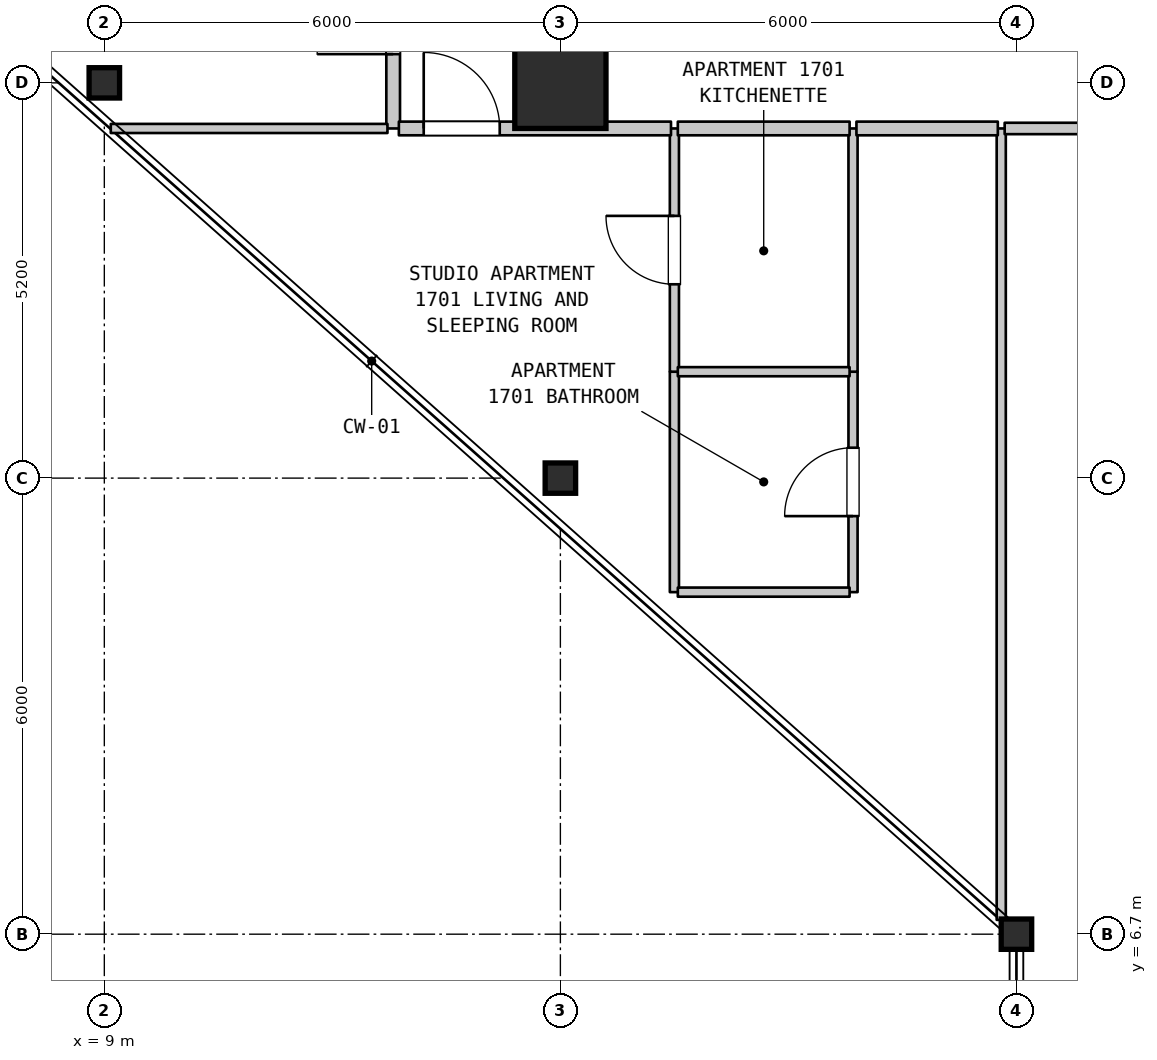
"""IFC4 building model, lengths in metres.
Left out: names, types, materials, properties, quantities, classifications, styles, units other than length and angle.
Written with IfcOpenShell. Run it as: python <this file> out.ifc"""

import sys

from ifc_helpers import new_model, si_unit, direction, frame, frame_2d, origin, origin_2d, place, context, subcontext, project, spatial, rectangle, i_section, extrude, element, fill, save


model = new_model("IFC4")
c1 = context("Model", 3, precision=1e-05, world=origin(), true_north=direction((0.0, 1.0)))
c2 = subcontext(c1, "Body", "Model", "MODEL_VIEW")
j1 = project(units=[si_unit("LENGTHUNIT", "METRE"), si_unit("PLANEANGLEUNIT", "RADIAN")], contexts=[c1])
p1 = place(None, origin())
s1 = spatial("IfcSite", under=j1, at=p1, CompositionType="ELEMENT")
p2 = place(p1, origin())
s2 = spatial("IfcBuilding", under=s1, at=p2, CompositionType="ELEMENT")
p3 = place(p2, frame((0.0, 0.0, 73.8)))
s3 = spatial("IfcBuildingStorey", under=s2, at=p3, CompositionType="ELEMENT", Elevation=73.8)
for number, where, z_axis, x_axis in (
    (1, (9.0, 17.9, 0.0), (0.0, 0.0, 1.0), (1.0, 0.0, 0.0)),
    (2, (15.0, 12.7, 0.0), (0.0, 0.0, 1.0), (1.0, 0.0, 0.0)),
):
    element("IfcColumn", number, at=place(p3, frame(where, z_axis=z_axis, x_axis=x_axis)), inside=s3, PredefinedType="COLUMN", context=c2, shape_type="SweptSolid", body=[
        extrude(i_section(OverallWidth=0.401, OverallDepth=0.399, WebThickness=0.025, FlangeThickness=0.04, FilletRadius=0.015, at=origin_2d()), origin(), (0.0, 0.0, 1.0), 3.7),
    ])
p4 = place(p3, frame((15.0, 17.9, 0.0), z_axis=(0.0, 0.0, 1.0), x_axis=(1.0, 0.0, 0.0)))
e3 = element("IfcColumn", 3, at=p4, inside=s3, PredefinedType="COLUMN", context=c2, shape_type="SweptSolid", body=[
    extrude(rectangle(XDim=1.2, YDim=1.2, at=origin_2d()), origin(), (0.0, 0.0, 1.0), 3.7),
])
p5 = place(p3, frame((21.0, 6.7, 0.0), z_axis=(0.0, 0.0, 1.0), x_axis=(1.0, 0.0, 0.0)))
e4 = element("IfcColumn", 4, at=p5, inside=s3, PredefinedType="COLUMN", context=c2, shape_type="SweptSolid", body=[
    extrude(i_section(OverallWidth=0.401, OverallDepth=0.399, WebThickness=0.025, FlangeThickness=0.04, FilletRadius=0.015, at=origin_2d()), origin(), (0.0, 0.0, 1.0), 3.7),
])
p6 = place(p3, frame((12.8, 17.3, 0.0), z_axis=(0.0, 0.0, 1.0), x_axis=(0.0, 1.0, 0.0)))
e5 = element("IfcWall", 5, at=p6, inside=s3, PredefinedType="STANDARD", context=c2, shape_type="SweptSolid", body=[
    extrude(rectangle(XDim=3.1, YDim=0.18, at=frame_2d((1.55, 0.0))), origin(), (0.0, 0.0, 1.0), 3.385),
])
p7 = place(p6, frame((0.978, 0.0, 0.0)))
e6 = element("IfcOpeningElement", 6, at=p7, cuts=e5, PredefinedType="OPENING", context=c2, shape_type="SweptSolid", body=[
    extrude(rectangle(XDim=1.0, YDim=2.15, at=frame_2d((0.5, 1.075))), frame((0.0, 0.1, 0.0), z_axis=(0.0, -1.0, 0.0), x_axis=(1.0, 0.0, 0.0)), (0.0, 0.0, 1.0), 0.2),
])
p8 = place(p3, frame((16.5, 11.2, 0.0), z_axis=(0.0, 0.0, 1.0), x_axis=(0.0, 1.0, 0.0)))
e7 = element("IfcWall", 7, at=p8, inside=s3, PredefinedType="PARTITIONING", context=c2, shape_type="SweptSolid", body=[
    extrude(rectangle(XDim=2.9, YDim=0.12, at=frame_2d((1.45, 0.0))), origin(), (0.0, 0.0, 1.0), 3.385),
])
p9 = place(p3, frame((16.5, 14.1, 0.0), z_axis=(0.0, 0.0, 1.0), x_axis=(0.0, 1.0, 0.0)))
e8 = element("IfcWall", 8, at=p9, inside=s3, PredefinedType="PARTITIONING", context=c2, shape_type="SweptSolid", body=[
    extrude(rectangle(XDim=3.2, YDim=0.12, at=frame_2d((1.6, 0.0))), origin(), (0.0, 0.0, 1.0), 3.385),
])
p10 = place(p9, frame((1.15, 0.0, 0.0)))
e9 = element("IfcOpeningElement", 9, at=p10, cuts=e8, PredefinedType="OPENING", context=c2, shape_type="SweptSolid", body=[
    extrude(rectangle(XDim=0.9, YDim=2.15, at=frame_2d((0.45, 1.075))), frame((0.0, 0.07, 0.0), z_axis=(0.0, -1.0, 0.0), x_axis=(1.0, 0.0, 0.0)), (0.0, 0.0, 1.0), 0.14),
])
p11 = place(p3, frame((18.85, 11.2, 0.0), z_axis=(0.0, 0.0, 1.0), x_axis=(0.0, 1.0, 0.0)))
e10 = element("IfcWall", 10, at=p11, inside=s3, PredefinedType="PARTITIONING", context=c2, shape_type="SweptSolid", body=[
    extrude(rectangle(XDim=2.9, YDim=0.12, at=frame_2d((1.45, 0.0))), origin(), (0.0, 0.0, 1.0), 3.385),
])
p12 = place(p11, frame((1.0, 0.0, 0.0)))
e11 = element("IfcOpeningElement", 11, at=p12, cuts=e10, PredefinedType="OPENING", context=c2, shape_type="SweptSolid", body=[
    extrude(rectangle(XDim=0.9, YDim=2.1, at=frame_2d((0.45, 1.05))), frame((0.0, 0.07, 0.0), z_axis=(0.0, -1.0, 0.0), x_axis=(1.0, 0.0, 0.0)), (0.0, 0.0, 1.0), 0.14),
])
p13 = place(p3, frame((18.85, 14.1, 0.0), z_axis=(0.0, 0.0, 1.0), x_axis=(0.0, 1.0, 0.0)))
e12 = element("IfcWall", 12, at=p13, inside=s3, PredefinedType="PARTITIONING", context=c2, shape_type="SweptSolid", body=[
    extrude(rectangle(XDim=3.2, YDim=0.12, at=frame_2d((1.6, 0.0))), origin(), (0.0, 0.0, 1.0), 3.385),
])
p14 = place(p3, frame((20.8, 6.888, 0.0), z_axis=(0.0, 0.0, 1.0), x_axis=(0.0, 1.0, 0.0)))
e13 = element("IfcWall", 13, at=p14, inside=s3, PredefinedType="PARTITIONING", context=c2, shape_type="SweptSolid", body=[
    extrude(rectangle(XDim=10.412, YDim=0.12, at=frame_2d((5.206, 0.0))), origin(), (0.0, 0.0, 1.0), 3.385),
])
for number, where, z_axis, x_axis in (
    (14, (16.545, 11.2, 0.0), (0.0, 0.0, 1.0), (1.0, 0.0, 0.0)),
    (15, (16.545, 14.1, 0.0), (0.0, 0.0, 1.0), (1.0, 0.0, 0.0)),
):
    element("IfcWall", number, at=place(p3, frame(where, z_axis=z_axis, x_axis=x_axis)), inside=s3, PredefinedType="PARTITIONING", context=c2, shape_type="SweptSolid", body=[
        extrude(rectangle(XDim=2.26, YDim=0.12, at=frame_2d((1.13, 0.0))), origin(), (0.0, 0.0, 1.0), 3.385),
    ])
p15 = place(p3, frame((9.085, 17.3, 0.0), z_axis=(0.0, 0.0, 1.0), x_axis=(1.0, 0.0, 0.0)))
e16 = element("IfcWall", 16, at=p15, inside=s3, PredefinedType="PARTITIONING", context=c2, shape_type="SweptSolid", body=[
    extrude(rectangle(XDim=3.64, YDim=0.12, at=frame_2d((1.82, 0.0))), origin(), (0.0, 0.0, 1.0), 3.385),
])
p16 = place(p3, frame((12.875, 17.3, 0.0), z_axis=(0.0, 0.0, 1.0), x_axis=(1.0, 0.0, 0.0)))
e17 = element("IfcWall", 17, at=p16, inside=s3, PredefinedType="STANDARD", context=c2, shape_type="SweptSolid", body=[
    extrude(rectangle(XDim=3.58, YDim=0.18, at=frame_2d((1.79, 0.0))), origin(), (0.0, 0.0, 1.0), 3.385),
])
p17 = place(p16, frame((0.327, 0.0, 0.0)))
e18 = element("IfcOpeningElement", 18, at=p17, cuts=e17, PredefinedType="OPENING", context=c2, shape_type="SweptSolid", body=[
    extrude(rectangle(XDim=1.0, YDim=2.15, at=frame_2d((0.5, 1.075))), frame((0.0, 0.1, 0.0), z_axis=(0.0, -1.0, 0.0), x_axis=(1.0, 0.0, 0.0)), (0.0, 0.0, 1.0), 0.2),
])
p18 = place(p3, frame((16.545, 17.3, 0.0), z_axis=(0.0, 0.0, 1.0), x_axis=(1.0, 0.0, 0.0)))
e19 = element("IfcWall", 19, at=p18, inside=s3, PredefinedType="STANDARD", context=c2, shape_type="SweptSolid", body=[
    extrude(rectangle(XDim=2.26, YDim=0.18, at=frame_2d((1.13, 0.0))), origin(), (0.0, 0.0, 1.0), 3.385),
])
p19 = place(p3, frame((18.895, 17.3, 0.0), z_axis=(0.0, 0.0, 1.0), x_axis=(1.0, 0.0, 0.0)))
e20 = element("IfcWall", 20, at=p19, inside=s3, PredefinedType="STANDARD", context=c2, shape_type="SweptSolid", body=[
    extrude(rectangle(XDim=1.86, YDim=0.18, at=frame_2d((0.93, 0.0))), origin(), (0.0, 0.0, 1.0), 3.385),
])
p20 = place(p3, frame((20.845, 17.3, 0.0), z_axis=(0.0, 0.0, 1.0), x_axis=(1.0, 0.0, 0.0)))
e21 = element("IfcWall", 21, at=p20, inside=s3, PredefinedType="STANDARD", context=c2, shape_type="SweptSolid", body=[
    extrude(rectangle(XDim=3.91, YDim=0.15, at=frame_2d((1.955, 0.0))), origin(), (0.0, 0.0, 1.0), 3.385),
])
p21 = place(p20, frame((1.455, 0.0, 0.0)))
e22 = element("IfcOpeningElement", 22, at=p21, cuts=e21, PredefinedType="OPENING", context=c2, shape_type="SweptSolid", body=[
    extrude(rectangle(XDim=1.0, YDim=2.15, at=frame_2d((0.5, 1.075))), frame((0.0, 0.085, 0.0), z_axis=(0.0, -1.0, 0.0), x_axis=(1.0, 0.0, 0.0)), (0.0, 0.0, 1.0), 0.17),
])
p22 = place(p7, origin())
e23 = element("IfcDoor", 23, at=p22, inside=s3, OperationType="SINGLE_SWING_LEFT", PredefinedType="DOOR", context=c2, shape_type="SweptSolid", body=[
    extrude(rectangle(XDim=1.0, YDim=2.15, at=frame_2d((0.5, 1.075))), frame((0.0, 0.025, 0.0), z_axis=(0.0, -1.0, 0.0), x_axis=(1.0, 0.0, 0.0)), (0.0, 0.0, 1.0), 0.05),
])
fill(e6, e23)
p23 = place(p10, origin())
e24 = element("IfcDoor", 24, at=p23, inside=s3, OperationType="SINGLE_SWING_RIGHT", PredefinedType="DOOR", context=c2, shape_type="SweptSolid", body=[
    extrude(rectangle(XDim=0.9, YDim=2.15, at=frame_2d((0.45, 1.075))), frame((0.0, 0.025, 0.0), z_axis=(0.0, -1.0, 0.0), x_axis=(1.0, 0.0, 0.0)), (0.0, 0.0, 1.0), 0.05),
])
fill(e9, e24)
p24 = place(p12, origin())
e25 = element("IfcDoor", 25, at=p24, inside=s3, OperationType="SINGLE_SWING_LEFT", PredefinedType="DOOR", context=c2, shape_type="SweptSolid", body=[
    extrude(rectangle(XDim=0.9, YDim=2.1, at=frame_2d((0.45, 1.05))), frame((0.0, 0.025, 0.0), z_axis=(0.0, -1.0, 0.0), x_axis=(1.0, 0.0, 0.0)), (0.0, 0.0, 1.0), 0.05),
])
fill(e11, e25)
p25 = place(p17, origin())
e26 = element("IfcDoor", 26, at=p25, inside=s3, OperationType="SINGLE_SWING_LEFT", PredefinedType="DOOR", context=c2, shape_type="SweptSolid", body=[
    extrude(rectangle(XDim=1.0, YDim=2.15, at=frame_2d((0.5, 1.075))), frame((0.0, 0.025, 0.0), z_axis=(0.0, -1.0, 0.0), x_axis=(1.0, 0.0, 0.0)), (0.0, 0.0, 1.0), 0.05),
])
fill(e18, e26)
save(model, sys.argv[1])
